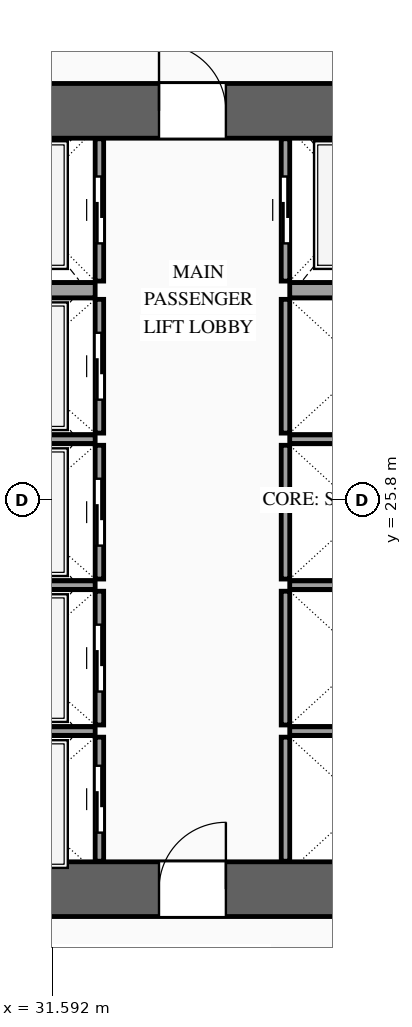
"""IFC4 building model, lengths in metres.
Left out: names, types, materials, properties, quantities, classifications, styles, units other than length and angle.
Written with IfcOpenShell. Run it as: python <this file> out.ifc"""

import sys

from ifc_helpers import new_model, si_unit, direction, frame, frame_2d, origin, place, context, subcontext, project, spatial, rectangle, extrude, source, transform, mapped, element, fill, save


model = new_model("IFC4")
c1 = context("Model", 3, precision=1e-05, world=origin(), true_north=direction((0.0, 1.0)))
c2 = subcontext(c1, "Body", "Model", "MODEL_VIEW")
j1 = project(units=[si_unit("LENGTHUNIT", "METRE"), si_unit("PLANEANGLEUNIT", "RADIAN")], contexts=[c1])
p1 = place(None, origin())
s1 = spatial("IfcSite", under=j1, at=p1, CompositionType="ELEMENT")
p2 = place(p1, origin())
s2 = spatial("IfcBuilding", under=s1, at=p2, CompositionType="ELEMENT")
p3 = place(p2, frame((0.0, 0.0, 49.6)))
s3 = spatial("IfcBuildingStorey", under=s2, at=p3, CompositionType="ELEMENT", Elevation=49.6)
p4 = place(p3, frame((23.35, 19.4, 0.0), z_axis=(0.0, 0.0, 1.0), x_axis=(1.0, 0.0, 0.0)))
e1 = element("IfcWall", 1, at=p4, inside=s3, PredefinedType="SHEAR", context=c2, shape_type="SweptSolid", body=[
    extrude(rectangle(XDim=27.3, YDim=0.9, at=frame_2d((13.65, 0.0))), origin(), (0.0, 0.0, 1.0), 3.6),
])
p5 = place(p4, frame((2.1, 0.0, 0.0)))
e2 = element("IfcOpeningElement", 2, at=p5, cuts=e1, PredefinedType="OPENING", context=c2, shape_type="SweptSolid", body=[
    extrude(rectangle(XDim=1.1, YDim=2.2, at=frame_2d((0.55, 1.1))), frame((0.0, 0.465, 0.0), z_axis=(0.0, -1.0, 0.0), x_axis=(1.0, 0.0, 0.0)), (0.0, 0.0, 1.0), 0.93),
])
p6 = place(p4, frame((10.0, 0.0, 0.0)))
e3 = element("IfcOpeningElement", 3, at=p6, cuts=e1, PredefinedType="OPENING", context=c2, shape_type="SweptSolid", body=[
    extrude(rectangle(XDim=1.1, YDim=2.2, at=frame_2d((0.55, 1.1))), frame((0.0, 0.465, 0.0), z_axis=(0.0, -1.0, 0.0), x_axis=(1.0, 0.0, 0.0)), (0.0, 0.0, 1.0), 0.93),
])
p7 = place(p4, frame((23.2, 0.0, 0.0)))
e4 = element("IfcOpeningElement", 4, at=p7, cuts=e1, PredefinedType="OPENING", context=c2, shape_type="SweptSolid", body=[
    extrude(rectangle(XDim=1.1, YDim=2.2, at=frame_2d((0.55, 1.1))), frame((0.0, 0.465, 0.0), z_axis=(0.0, -1.0, 0.0), x_axis=(1.0, 0.0, 0.0)), (0.0, 0.0, 1.0), 0.93),
])
p8 = place(p4, frame((19.82, 0.0, 0.0)))
e5 = element("IfcOpeningElement", 5, at=p8, cuts=e1, PredefinedType="OPENING", context=c2, shape_type="SweptSolid", body=[
    extrude(rectangle(XDim=0.9, YDim=2.15, at=frame_2d((0.45, 1.075))), frame((0.0, 0.465, 0.0), z_axis=(0.0, -1.0, 0.0), x_axis=(1.0, 0.0, 0.0)), (0.0, 0.0, 1.0), 0.93),
])
p9 = place(p4, frame((18.38, 0.0, 0.0)))
e6 = element("IfcOpeningElement", 6, at=p9, cuts=e1, PredefinedType="OPENING", context=c2, shape_type="SweptSolid", body=[
    extrude(rectangle(XDim=0.9, YDim=2.15, at=frame_2d((0.45, 1.075))), frame((0.0, 0.465, 0.0), z_axis=(0.0, -1.0, 0.0), x_axis=(1.0, 0.0, 0.0)), (0.0, 0.0, 1.0), 0.93),
])
p10 = place(p3, frame((23.35, 32.2, 0.0), z_axis=(0.0, 0.0, 1.0), x_axis=(1.0, 0.0, 0.0)))
e7 = element("IfcWall", 7, at=p10, inside=s3, PredefinedType="SHEAR", context=c2, shape_type="SweptSolid", body=[
    extrude(rectangle(XDim=27.3, YDim=0.9, at=frame_2d((13.65, 0.0))), origin(), (0.0, 0.0, 1.0), 3.6),
])
p11 = place(p10, frame((4.72, 0.0, 0.0)))
e8 = element("IfcOpeningElement", 8, at=p11, cuts=e7, PredefinedType="OPENING", context=c2, shape_type="SweptSolid", body=[
    extrude(rectangle(XDim=0.9, YDim=2.15, at=frame_2d((0.45, 1.075))), frame((0.0, 0.465, 0.0), z_axis=(0.0, -1.0, 0.0), x_axis=(1.0, 0.0, 0.0)), (0.0, 0.0, 1.0), 0.93),
])
p12 = place(p10, frame((10.0, 0.0, 0.0)))
e9 = element("IfcOpeningElement", 9, at=p12, cuts=e7, PredefinedType="OPENING", context=c2, shape_type="SweptSolid", body=[
    extrude(rectangle(XDim=1.1, YDim=2.2, at=frame_2d((0.55, 1.1))), frame((0.0, 0.465, 0.0), z_axis=(0.0, -1.0, 0.0), x_axis=(1.0, 0.0, 0.0)), (0.0, 0.0, 1.0), 0.93),
])
p13 = place(p10, frame((15.85, 0.0, 0.0)))
e10 = element("IfcOpeningElement", 10, at=p13, cuts=e7, PredefinedType="OPENING", context=c2, shape_type="SweptSolid", body=[
    extrude(rectangle(XDim=1.1, YDim=2.2, at=frame_2d((0.55, 1.1))), frame((0.0, 0.465, 0.0), z_axis=(0.0, -1.0, 0.0), x_axis=(1.0, 0.0, 0.0)), (0.0, 0.0, 1.0), 0.93),
])
p14 = place(p10, frame((19.05, 0.0, 0.0)))
e11 = element("IfcOpeningElement", 11, at=p14, cuts=e7, PredefinedType="OPENING", context=c2, shape_type="SweptSolid", body=[
    extrude(rectangle(XDim=0.9, YDim=2.15, at=frame_2d((0.45, 1.075))), frame((0.0, 0.465, 0.0), z_axis=(0.0, -1.0, 0.0), x_axis=(1.0, 0.0, 0.0)), (0.0, 0.0, 1.0), 0.93),
])
p15 = place(p3, frame((32.37, 19.86, 0.0), z_axis=(0.0, 0.0, 1.0), x_axis=(0.0, 1.0, 0.0)))
e12 = element("IfcWall", 12, at=p15, inside=s3, PredefinedType="SOLIDWALL", context=c2, shape_type="SweptSolid", body=[
    extrude(rectangle(XDim=2.04, YDim=0.14, at=frame_2d((1.02, 0.0))), origin(), (0.0, 0.0, 1.0), 3.38),
])
p16 = place(p15, frame((0.47, 0.0, 0.0)))
e13 = element("IfcOpeningElement", 13, at=p16, cuts=e12, PredefinedType="OPENING", context=c2, shape_type="SweptSolid", body=[
    extrude(rectangle(XDim=1.1, YDim=2.2, at=frame_2d((0.55, 1.1))), frame((0.0, 0.085, 0.0), z_axis=(0.0, -1.0, 0.0), x_axis=(1.0, 0.0, 0.0)), (0.0, 0.0, 1.0), 0.17),
])
m1 = source(origin(), c2, "Body", "SweptSolid", [
    extrude(rectangle(XDim=2.5, YDim=0.14, at=frame_2d((1.25, 0.0))), origin(), (0.0, 0.0, 1.0), 3.38),
])
p17 = place(p3, frame((29.8, 22.0, 0.0), z_axis=(0.0, 0.0, 1.0), x_axis=(1.0, 0.0, 0.0)))
e14 = element("IfcWall", 14, at=p17, inside=s3, PredefinedType="SOLIDWALL", context=c2, shape_type="MappedRepresentation", body=[
    mapped(m1, transform((0.0, 0.0, 0.0), scale=1.0)),
])
p18 = place(p3, frame((32.37, 22.1, 0.0), z_axis=(0.0, 0.0, 1.0), x_axis=(0.0, 1.0, 0.0)))
e15 = element("IfcWall", 15, at=p18, inside=s3, PredefinedType="SOLIDWALL", context=c2, shape_type="SweptSolid", body=[
    extrude(rectangle(XDim=2.2, YDim=0.14, at=frame_2d((1.1, 0.0))), origin(), (0.0, 0.0, 1.0), 3.38),
])
p19 = place(p18, frame((0.55, 0.0, 0.0)))
e16 = element("IfcOpeningElement", 16, at=p19, cuts=e15, PredefinedType="OPENING", context=c2, shape_type="SweptSolid", body=[
    extrude(rectangle(XDim=1.1, YDim=2.2, at=frame_2d((0.55, 1.1))), frame((0.0, 0.085, 0.0), z_axis=(0.0, -1.0, 0.0), x_axis=(1.0, 0.0, 0.0)), (0.0, 0.0, 1.0), 0.17),
])
p20 = place(p3, frame((29.8, 24.4, 0.0), z_axis=(0.0, 0.0, 1.0), x_axis=(1.0, 0.0, 0.0)))
e17 = element("IfcWall", 17, at=p20, inside=s3, PredefinedType="SOLIDWALL", context=c2, shape_type="MappedRepresentation", body=[
    mapped(m1, transform((0.0, 0.0, 0.0), scale=1.0)),
])
p21 = place(p3, frame((32.37, 24.5, 0.0), z_axis=(0.0, 0.0, 1.0), x_axis=(0.0, 1.0, 0.0)))
e18 = element("IfcWall", 18, at=p21, inside=s3, PredefinedType="SOLIDWALL", context=c2, shape_type="SweptSolid", body=[
    extrude(rectangle(XDim=2.2, YDim=0.14, at=frame_2d((1.1, 0.0))), origin(), (0.0, 0.0, 1.0), 3.38),
])
p22 = place(p21, frame((0.55, 0.0, 0.0)))
e19 = element("IfcOpeningElement", 19, at=p22, cuts=e18, PredefinedType="OPENING", context=c2, shape_type="SweptSolid", body=[
    extrude(rectangle(XDim=1.1, YDim=2.2, at=frame_2d((0.55, 1.1))), frame((0.0, 0.085, 0.0), z_axis=(0.0, -1.0, 0.0), x_axis=(1.0, 0.0, 0.0)), (0.0, 0.0, 1.0), 0.17),
])
p23 = place(p3, frame((29.8, 26.8, 0.0), z_axis=(0.0, 0.0, 1.0), x_axis=(1.0, 0.0, 0.0)))
e20 = element("IfcWall", 20, at=p23, inside=s3, PredefinedType="SOLIDWALL", context=c2, shape_type="MappedRepresentation", body=[
    mapped(m1, transform((0.0, 0.0, 0.0), scale=1.0)),
])
p24 = place(p3, frame((32.37, 26.9, 0.0), z_axis=(0.0, 0.0, 1.0), x_axis=(0.0, 1.0, 0.0)))
e21 = element("IfcWall", 21, at=p24, inside=s3, PredefinedType="SOLIDWALL", context=c2, shape_type="SweptSolid", body=[
    extrude(rectangle(XDim=2.2, YDim=0.14, at=frame_2d((1.1, 0.0))), origin(), (0.0, 0.0, 1.0), 3.38),
])
p25 = place(p24, frame((0.55, 0.0, 0.0)))
e22 = element("IfcOpeningElement", 22, at=p25, cuts=e21, PredefinedType="OPENING", context=c2, shape_type="SweptSolid", body=[
    extrude(rectangle(XDim=1.1, YDim=2.2, at=frame_2d((0.55, 1.1))), frame((0.0, 0.085, 0.0), z_axis=(0.0, -1.0, 0.0), x_axis=(1.0, 0.0, 0.0)), (0.0, 0.0, 1.0), 0.17),
])
p26 = place(p3, frame((32.37, 29.4, 0.0), z_axis=(0.0, 0.0, 1.0), x_axis=(0.0, 1.0, 0.0)))
e23 = element("IfcWall", 23, at=p26, inside=s3, PredefinedType="SOLIDWALL", context=c2, shape_type="SweptSolid", body=[
    extrude(rectangle(XDim=2.34, YDim=0.14, at=frame_2d((1.17, 0.0))), origin(), (0.0, 0.0, 1.0), 3.38),
])
p27 = place(p26, frame((0.62, 0.0, 0.0)))
e24 = element("IfcOpeningElement", 24, at=p27, cuts=e23, PredefinedType="OPENING", context=c2, shape_type="SweptSolid", body=[
    extrude(rectangle(XDim=1.1, YDim=2.2, at=frame_2d((0.55, 1.1))), frame((0.0, 0.085, 0.0), z_axis=(0.0, -1.0, 0.0), x_axis=(1.0, 0.0, 0.0)), (0.0, 0.0, 1.0), 0.17),
])
m2 = source(origin(), c2, "Body", "SweptSolid", [
    extrude(rectangle(XDim=2.5, YDim=0.25, at=frame_2d((1.25, 0.0))), origin(), (0.0, 0.0, 1.0), 3.38),
])
p28 = place(p3, frame((29.8, 29.25, 0.0), z_axis=(0.0, 0.0, 1.0), x_axis=(1.0, 0.0, 0.0)))
e25 = element("IfcWall", 25, at=p28, inside=s3, PredefinedType="SOLIDWALL", context=c2, shape_type="MappedRepresentation", body=[
    mapped(m2, transform((0.0, 0.0, 0.0), scale=1.0)),
])
m3 = source(origin(), c2, "Body", "SweptSolid", [
    extrude(rectangle(XDim=2.04, YDim=0.14, at=frame_2d((1.02, 0.0))), origin(), (0.0, 0.0, 1.0), 3.38),
])
p29 = place(p3, frame((35.43, 19.86, 0.0), z_axis=(0.0, 0.0, 1.0), x_axis=(0.0, 1.0, 0.0)))
e26 = element("IfcWall", 26, at=p29, inside=s3, PredefinedType="SOLIDWALL", context=c2, shape_type="MappedRepresentation", body=[
    mapped(m3, transform((0.0, 0.0, 0.0), scale=1.0)),
])
m4 = source(origin(), c2, "Body", "SweptSolid", [
    extrude(rectangle(XDim=2.4, YDim=0.14, at=frame_2d((1.2, 0.0))), origin(), (0.0, 0.0, 1.0), 3.38),
])
p30 = place(p3, frame((35.5, 22.0, 0.0), z_axis=(0.0, 0.0, 1.0), x_axis=(1.0, 0.0, 0.0)))
e27 = element("IfcWall", 27, at=p30, inside=s3, PredefinedType="SOLIDWALL", context=c2, shape_type="MappedRepresentation", body=[
    mapped(m4, transform((0.0, 0.0, 0.0), scale=1.0)),
])
m5 = source(origin(), c2, "Body", "SweptSolid", [
    extrude(rectangle(XDim=2.2, YDim=0.14, at=frame_2d((1.1, 0.0))), origin(), (0.0, 0.0, 1.0), 3.38),
])
p31 = place(p3, frame((35.43, 22.1, 0.0), z_axis=(0.0, 0.0, 1.0), x_axis=(0.0, 1.0, 0.0)))
e28 = element("IfcWall", 28, at=p31, inside=s3, PredefinedType="SOLIDWALL", context=c2, shape_type="MappedRepresentation", body=[
    mapped(m5, transform((0.0, 0.0, 0.0), scale=1.0)),
])
p32 = place(p3, frame((35.5, 24.4, 0.0), z_axis=(0.0, 0.0, 1.0), x_axis=(1.0, 0.0, 0.0)))
e29 = element("IfcWall", 29, at=p32, inside=s3, PredefinedType="SOLIDWALL", context=c2, shape_type="MappedRepresentation", body=[
    mapped(m4, transform((0.0, 0.0, 0.0), scale=1.0)),
])
p33 = place(p3, frame((35.43, 24.5, 0.0), z_axis=(0.0, 0.0, 1.0), x_axis=(0.0, 1.0, 0.0)))
e30 = element("IfcWall", 30, at=p33, inside=s3, PredefinedType="SOLIDWALL", context=c2, shape_type="MappedRepresentation", body=[
    mapped(m5, transform((0.0, 0.0, 0.0), scale=1.0)),
])
p34 = place(p3, frame((35.5, 26.8, 0.0), z_axis=(0.0, 0.0, 1.0), x_axis=(1.0, 0.0, 0.0)))
e31 = element("IfcWall", 31, at=p34, inside=s3, PredefinedType="SOLIDWALL", context=c2, shape_type="MappedRepresentation", body=[
    mapped(m4, transform((0.0, 0.0, 0.0), scale=1.0)),
])
m6 = source(origin(), c2, "Body", "SweptSolid", [
    extrude(rectangle(XDim=2.2, YDim=0.14, at=frame_2d((1.1, 0.0))), origin(), (0.0, 0.0, 1.0), 3.38),
])
p35 = place(p3, frame((35.43, 26.9, 0.0), z_axis=(0.0, 0.0, 1.0), x_axis=(0.0, 1.0, 0.0)))
e32 = element("IfcWall", 32, at=p35, inside=s3, PredefinedType="SOLIDWALL", context=c2, shape_type="MappedRepresentation", body=[
    mapped(m6, transform((0.0, 0.0, 0.0), scale=1.0)),
])
p36 = place(p3, frame((35.43, 29.4, 0.0), z_axis=(0.0, 0.0, 1.0), x_axis=(0.0, 1.0, 0.0)))
e33 = element("IfcWall", 33, at=p36, inside=s3, PredefinedType="SOLIDWALL", context=c2, shape_type="SweptSolid", body=[
    extrude(rectangle(XDim=2.34, YDim=0.14, at=frame_2d((1.17, 0.0))), origin(), (0.0, 0.0, 1.0), 3.38),
])
p37 = place(p36, frame((0.62, 0.0, 0.0)))
e34 = element("IfcOpeningElement", 34, at=p37, cuts=e33, PredefinedType="OPENING", context=c2, shape_type="SweptSolid", body=[
    extrude(rectangle(XDim=1.1, YDim=2.2, at=frame_2d((0.55, 1.1))), frame((0.0, 0.085, 0.0), z_axis=(0.0, -1.0, 0.0), x_axis=(1.0, 0.0, 0.0)), (0.0, 0.0, 1.0), 0.17),
])
m7 = source(origin(), c2, "Body", "SweptSolid", [
    extrude(rectangle(XDim=2.4, YDim=0.25, at=frame_2d((1.2, 0.0))), origin(), (0.0, 0.0, 1.0), 3.38),
])
p38 = place(p3, frame((35.5, 29.25, 0.0), z_axis=(0.0, 0.0, 1.0), x_axis=(1.0, 0.0, 0.0)))
e35 = element("IfcWall", 35, at=p38, inside=s3, PredefinedType="SOLIDWALL", context=c2, shape_type="MappedRepresentation", body=[
    mapped(m7, transform((0.0, 0.0, 0.0), scale=1.0)),
])
m8 = source(origin(), c2, "Body", "SweptSolid", [
    extrude(rectangle(XDim=1.1, YDim=2.2, at=frame_2d((0.55, 1.1))), frame((0.0, 0.025, 0.0), z_axis=(0.0, -1.0, 0.0), x_axis=(1.0, 0.0, 0.0)), (0.0, 0.0, 1.0), 0.05),
])
p39 = place(p16, origin())
e36 = element("IfcDoor", 36, at=p39, inside=s3, OperationType="SLIDING_TO_LEFT", PredefinedType="DOOR", context=c2, shape_type="MappedRepresentation", body=[
    mapped(m8, transform((0.0, 0.0, 0.0), scale=1.0)),
])
fill(e13, e36)
p40 = place(p19, origin())
e37 = element("IfcDoor", 37, at=p40, inside=s3, OperationType="SLIDING_TO_RIGHT", PredefinedType="DOOR", context=c2, shape_type="MappedRepresentation", body=[
    mapped(m8, transform((0.0, 0.0, 0.0), scale=1.0)),
])
fill(e16, e37)
p41 = place(p22, origin())
e38 = element("IfcDoor", 38, at=p41, inside=s3, OperationType="SLIDING_TO_LEFT", PredefinedType="DOOR", context=c2, shape_type="MappedRepresentation", body=[
    mapped(m8, transform((0.0, 0.0, 0.0), scale=1.0)),
])
fill(e19, e38)
p42 = place(p25, origin())
e39 = element("IfcDoor", 39, at=p42, inside=s3, OperationType="SLIDING_TO_RIGHT", PredefinedType="DOOR", context=c2, shape_type="MappedRepresentation", body=[
    mapped(m8, transform((0.0, 0.0, 0.0), scale=1.0)),
])
fill(e22, e39)
p43 = place(p27, origin())
e40 = element("IfcDoor", 40, at=p43, inside=s3, OperationType="SLIDING_TO_LEFT", PredefinedType="DOOR", context=c2, shape_type="MappedRepresentation", body=[
    mapped(m8, transform((0.0, 0.0, 0.0), scale=1.0)),
])
fill(e24, e40)
p44 = place(p37, origin())
e41 = element("IfcDoor", 41, at=p44, inside=s3, OperationType="SLIDING_TO_RIGHT", PredefinedType="DOOR", context=c2, shape_type="MappedRepresentation", body=[
    mapped(m8, transform((0.0, 0.0, 0.0), scale=1.0)),
])
fill(e34, e41)
m9 = source(origin(), c2, "Body", "SweptSolid", [
    extrude(rectangle(XDim=1.1, YDim=2.2, at=frame_2d((0.55, 1.1))), frame((0.0, 0.025, 0.0), z_axis=(0.0, -1.0, 0.0), x_axis=(1.0, 0.0, 0.0)), (0.0, 0.0, 1.0), 0.05),
])
p45 = place(p6, origin())
e42 = element("IfcDoor", 42, at=p45, inside=s3, OperationType="SINGLE_SWING_RIGHT", PredefinedType="DOOR", context=c2, shape_type="MappedRepresentation", body=[
    mapped(m9, transform((0.0, 0.0, 0.0), scale=1.0)),
])
fill(e3, e42)
p46 = place(p12, origin())
e43 = element("IfcDoor", 43, at=p46, inside=s3, OperationType="SINGLE_SWING_LEFT", PredefinedType="DOOR", context=c2, shape_type="MappedRepresentation", body=[
    mapped(m9, transform((0.0, 0.0, 0.0), scale=1.0)),
])
fill(e9, e43)
save(model, sys.argv[1])
